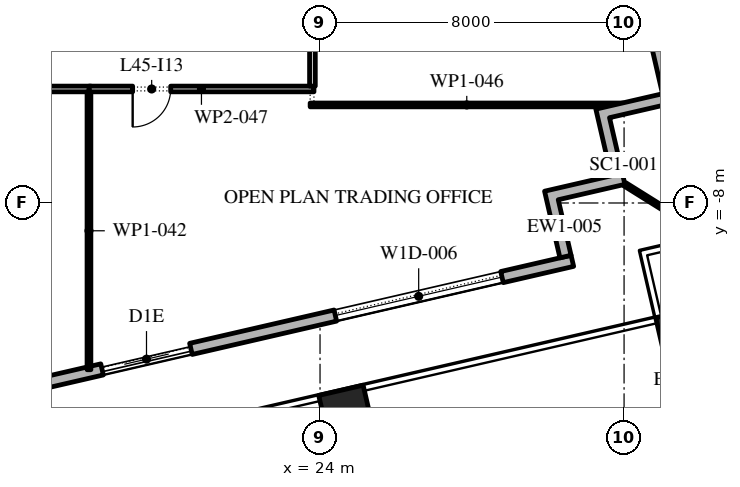
"""IFC4 building model, lengths in metres.
Left out: names, types, materials, properties, quantities, classifications, styles, units other than length and angle.
Written with IfcOpenShell. Run it as: python <this file> out.ifc"""

import sys

from ifc_helpers import new_model, si_unit, direction, frame, frame_2d, origin, origin_2d, place, context, subcontext, project, spatial, polyline, rectangle, outline, extrude, element, fill, save


model = new_model("IFC4")
c1 = context("Model", 3, precision=1e-05, world=origin(), true_north=direction((0.0, 1.0)))
c2 = subcontext(c1, "Body", "Model", "MODEL_VIEW")
j1 = project(units=[si_unit("LENGTHUNIT", "METRE"), si_unit("PLANEANGLEUNIT", "RADIAN")], contexts=[c1])
p1 = place(None, origin())
s1 = spatial("IfcSite", under=j1, at=p1, CompositionType="ELEMENT")
p2 = place(p1, origin())
s2 = spatial("IfcBuilding", under=s1, at=p2, CompositionType="ELEMENT")
p3 = place(p2, frame((0.0, 0.0, 205.2)))
s3 = spatial("IfcBuildingStorey", under=s2, at=p3, CompositionType="ELEMENT", Elevation=205.2)
for number, where, z_axis, x_axis in (
    (1, (24.685, -13.514, 0.0), (0.0, 0.0, 1.0), (0.974, 0.225, 0.0)),
    (2, (33.551, -11.467, 0.0), (0.0, 0.0, 1.0), (0.974, 0.225, 0.0)),
):
    element("IfcColumn", number, at=place(p3, frame(where, z_axis=z_axis, x_axis=x_axis)), inside=s3, PredefinedType="COLUMN", context=c2, shape_type="SweptSolid", body=[
        extrude(rectangle(XDim=1.2, YDim=1.2, at=origin_2d()), origin(), (0.0, 0.0, 1.0), 4.2),
    ])
p4 = place(p3, frame((-17.592, -20.657, 0.0), z_axis=(0.0, 0.0, 1.0), x_axis=(0.974370243697, 0.224950279389, 0.0)))
e3 = element("IfcWall", 3, at=p4, inside=s3, PredefinedType="STANDARD", context=c2, shape_type="SweptSolid", body=[
    extrude(rectangle(XDim=49.5, YDim=0.3, at=frame_2d((24.75, 0.0))), origin(), (0.0, 0.0, 1.0), 4.0),
])
p5 = place(p4, frame((2.8, 0.0, 0.0)))
e4 = element("IfcOpeningElement", 4, at=p5, cuts=e3, PredefinedType="OPENING", context=c2, shape_type="SweptSolid", body=[
    extrude(rectangle(XDim=2.4, YDim=3.5, at=frame_2d((1.2, 1.75))), frame((0.0, 0.16, 0.0), z_axis=(0.0, -1.0, 0.0), x_axis=(1.0, 0.0, 0.0)), (0.0, 0.0, 1.0), 0.32),
])
p6 = place(p4, frame((9.9, 0.0, 0.45)))
e5 = element("IfcOpeningElement", 5, at=p6, cuts=e3, PredefinedType="OPENING", context=c2, shape_type="SweptSolid", body=[
    extrude(rectangle(XDim=4.5, YDim=2.575, at=frame_2d((2.25, 1.288))), frame((0.0, 0.16, 0.0), z_axis=(0.0, -1.0, 0.0), x_axis=(1.0, 0.0, 0.0)), (0.0, 0.0, 1.0), 0.32),
])
p7 = place(p4, frame((18.2, 0.0, 0.45)))
e6 = element("IfcOpeningElement", 6, at=p7, cuts=e3, PredefinedType="OPENING", context=c2, shape_type="SweptSolid", body=[
    extrude(rectangle(XDim=4.5, YDim=3.05, at=frame_2d((2.25, 1.525))), frame((0.0, 0.16, 0.0), z_axis=(0.0, -1.0, 0.0), x_axis=(1.0, 0.0, 0.0)), (0.0, 0.0, 1.0), 0.32),
])
p8 = place(p4, frame((26.5, 0.0, 0.45)))
e7 = element("IfcOpeningElement", 7, at=p8, cuts=e3, PredefinedType="OPENING", context=c2, shape_type="SweptSolid", body=[
    extrude(rectangle(XDim=4.5, YDim=2.75, at=frame_2d((2.25, 1.375))), frame((0.0, 0.16, 0.0), z_axis=(0.0, -1.0, 0.0), x_axis=(1.0, 0.0, 0.0)), (0.0, 0.0, 1.0), 0.32),
])
p9 = place(p4, frame((36.8, 0.0, 0.0)))
e8 = element("IfcOpeningElement", 8, at=p9, cuts=e3, PredefinedType="OPENING", context=c2, shape_type="SweptSolid", body=[
    extrude(rectangle(XDim=2.4, YDim=3.275, at=frame_2d((1.2, 1.637))), frame((0.0, 0.16, 0.0), z_axis=(0.0, -1.0, 0.0), x_axis=(1.0, 0.0, 0.0)), (0.0, 0.0, 1.0), 0.32),
])
p10 = place(p4, frame((43.1, 0.0, 0.45)))
e9 = element("IfcOpeningElement", 9, at=p10, cuts=e3, PredefinedType="OPENING", context=c2, shape_type="SweptSolid", body=[
    extrude(rectangle(XDim=4.5, YDim=2.875, at=frame_2d((2.25, 1.438))), frame((0.0, 0.16, 0.0), z_axis=(0.0, -1.0, 0.0), x_axis=(1.0, 0.0, 0.0)), (0.0, 0.0, 1.0), 0.32),
])
p11 = place(p3, frame((33.157, -5.092, 0.0), z_axis=(0.0, 0.0, 1.0), x_axis=(-0.224950279389, 0.974370243697, 0.0)))
e10 = element("IfcWall", 10, at=p11, inside=s3, PredefinedType="STANDARD", context=c2, shape_type="SweptSolid", body=[
    extrude(rectangle(XDim=49.5, YDim=0.3, at=frame_2d((24.75, 0.0))), origin(), (0.0, 0.0, 1.0), 4.0),
])
p12 = place(p11, frame((2.207, 0.0, 0.0)))
e11 = element("IfcOpeningElement", 11, at=p12, cuts=e10, PredefinedType="OPENING", context=c2, shape_type="SweptSolid", body=[
    extrude(rectangle(XDim=2.4, YDim=3.125, at=frame_2d((1.2, 1.562))), frame((0.0, 0.16, 0.0), z_axis=(0.0, -1.0, 0.0), x_axis=(1.0, 0.0, 0.0)), (0.0, 0.0, 1.0), 0.32),
])
p13 = place(p11, frame((8.121, 0.0, 0.45)))
e12 = element("IfcOpeningElement", 12, at=p13, cuts=e10, PredefinedType="OPENING", context=c2, shape_type="SweptSolid", body=[
    extrude(rectangle(XDim=4.5, YDim=2.875, at=frame_2d((2.25, 1.438))), frame((0.0, 0.16, 0.0), z_axis=(0.0, -1.0, 0.0), x_axis=(1.0, 0.0, 0.0)), (0.0, 0.0, 1.0), 0.32),
])
p14 = place(p11, frame((15.236, 0.0, 0.45)))
e13 = element("IfcOpeningElement", 13, at=p14, cuts=e10, PredefinedType="OPENING", context=c2, shape_type="SweptSolid", body=[
    extrude(rectangle(XDim=4.5, YDim=2.875, at=frame_2d((2.25, 1.438))), frame((0.0, 0.16, 0.0), z_axis=(0.0, -1.0, 0.0), x_axis=(1.0, 0.0, 0.0)), (0.0, 0.0, 1.0), 0.32),
])
p15 = place(p11, frame((22.35, 0.0, 0.45)))
e14 = element("IfcOpeningElement", 14, at=p15, cuts=e10, PredefinedType="OPENING", context=c2, shape_type="SweptSolid", body=[
    extrude(rectangle(XDim=4.5, YDim=3.0, at=frame_2d((2.25, 1.5))), frame((0.0, 0.16, 0.0), z_axis=(0.0, -1.0, 0.0), x_axis=(1.0, 0.0, 0.0)), (0.0, 0.0, 1.0), 0.32),
])
p16 = place(p11, frame((30.514, 0.0, 0.0)))
e15 = element("IfcOpeningElement", 15, at=p16, cuts=e10, PredefinedType="OPENING", context=c2, shape_type="SweptSolid", body=[
    extrude(rectangle(XDim=2.4, YDim=3.45, at=frame_2d((1.2, 1.725))), frame((0.0, 0.16, 0.0), z_axis=(0.0, -1.0, 0.0), x_axis=(1.0, 0.0, 0.0)), (0.0, 0.0, 1.0), 0.32),
])
p17 = place(p11, frame((36.579, 0.0, 0.45)))
e16 = element("IfcOpeningElement", 16, at=p17, cuts=e10, PredefinedType="OPENING", context=c2, shape_type="SweptSolid", body=[
    extrude(rectangle(XDim=4.5, YDim=3.05, at=frame_2d((2.25, 1.525))), frame((0.0, 0.16, 0.0), z_axis=(0.0, -1.0, 0.0), x_axis=(1.0, 0.0, 0.0)), (0.0, 0.0, 1.0), 0.32),
])
p18 = place(p11, frame((43.693, 0.0, 0.45)))
e17 = element("IfcOpeningElement", 17, at=p18, cuts=e10, PredefinedType="OPENING", context=c2, shape_type="SweptSolid", body=[
    extrude(rectangle(XDim=4.5, YDim=3.05, at=frame_2d((2.25, 1.525))), frame((0.0, 0.16, 0.0), z_axis=(0.0, -1.0, 0.0), x_axis=(1.0, 0.0, 0.0)), (0.0, 0.0, 1.0), 0.32),
])
p19 = place(p3, origin())
e18 = element("IfcWall", 18, at=p19, inside=s3, PredefinedType="STANDARD", context=c2, shape_type="SweptSolid", body=[
    extrude(outline(polyline([(31.662, -7.285), (31.257, -5.531), (33.303, -5.058), (33.371, -5.351), (31.617, -5.756), (32.022, -7.51), (30.268, -7.914), (30.605, -9.376), (30.313, -9.443), (29.908, -7.69), (31.662, -7.285)])), origin(), (0.0, 0.0, 1.0), 4.0),
])
p20 = place(p3, frame((32.022, -7.51, -0.05), z_axis=(0.0, 0.0, 1.0), x_axis=(0.848047176257, -0.529920736377, 0.0)))
e19 = element("IfcWall", 19, at=p20, inside=s3, PredefinedType="STANDARD", context=c2, shape_type="SweptSolid", body=[
    extrude(rectangle(XDim=2.526, YDim=0.1, at=frame_2d((1.263, 0.0))), origin(), (0.0, 0.0, 1.0), 4.05),
])
p21 = place(p3, frame((17.97, -5.0, 0.0), z_axis=(0.0, 0.0, 1.0), x_axis=(-1.0, 0.0, 0.0)))
e20 = element("IfcWall", 20, at=p21, inside=s3, PredefinedType="PARTITIONING", context=c2, shape_type="SweptSolid", body=[
    extrude(rectangle(XDim=7.97, YDim=0.15, at=frame_2d((3.985, 0.0))), origin(), (0.0, 0.0, 1.0), 4.0),
])
p22 = place(p3, frame((17.92, -5.075, 0.0), z_axis=(0.0, 0.0, 1.0), x_axis=(0.0, -1.0, 0.0)))
e21 = element("IfcWall", 21, at=p22, inside=s3, PredefinedType="PARTITIONING", context=c2, shape_type="SweptSolid", body=[
    extrude(rectangle(XDim=7.312, YDim=0.1, at=frame_2d((3.656, 0.0))), origin(), (0.0, 0.0, 1.0), 4.0),
])
p23 = place(p3, frame((23.74, -5.42, 0.0), z_axis=(0.0, 0.0, 1.0), x_axis=(1.0, 0.0, 0.0)))
e22 = element("IfcWall", 22, at=p23, inside=s3, PredefinedType="PARTITIONING", context=c2, shape_type="SweptSolid", body=[
    extrude(rectangle(XDim=8.242, YDim=0.1, at=frame_2d((4.121, 0.0))), origin(), (0.0, 0.0, 1.0), 4.0),
])
p24 = place(p3, frame((23.84, -5.0, 0.0), z_axis=(0.0, 0.0, 1.0), x_axis=(-1.0, 0.0, 0.0)))
e23 = element("IfcWall", 23, at=p24, inside=s3, PredefinedType="PARTITIONING", context=c2, shape_type="SweptSolid", body=[
    extrude(rectangle(XDim=5.92, YDim=0.15, at=frame_2d((2.96, 0.0))), origin(), (0.0, 0.0, 1.0), 4.0),
])
p25 = place(p24, frame((3.77, 0.0, 0.0)))
e24 = element("IfcOpeningElement", 24, at=p25, cuts=e23, PredefinedType="OPENING", context=c2, shape_type="SweptSolid", body=[
    extrude(rectangle(XDim=1.0, YDim=2.1, at=frame_2d((0.5, 1.05))), frame((0.0, 0.085, 0.0), z_axis=(0.0, -1.0, 0.0), x_axis=(1.0, 0.0, 0.0)), (0.0, 0.0, 1.0), 0.17),
])
p26 = place(p3, frame((23.8, 2.74, 0.0), z_axis=(0.0, 0.0, 1.0), x_axis=(0.0, -1.0, 0.0)))
e25 = element("IfcWall", 25, at=p26, inside=s3, PredefinedType="PARTITIONING", context=c2, shape_type="SweptSolid", body=[
    extrude(rectangle(XDim=7.665, YDim=0.15, at=frame_2d((3.833, 0.0))), origin(), (0.0, 0.0, 1.0), 4.0),
])
p27 = place(p26, frame((4.09, 0.0, 0.0)))
e26 = element("IfcOpeningElement", 26, at=p27, cuts=e25, PredefinedType="OPENING", context=c2, shape_type="SweptSolid", body=[
    extrude(rectangle(XDim=1.0, YDim=2.1, at=frame_2d((0.5, 1.05))), frame((0.0, 0.085, 0.0), z_axis=(0.0, -1.0, 0.0), x_axis=(1.0, 0.0, 0.0)), (0.0, 0.0, 1.0), 0.17),
])
p28 = place(p9, origin())
e27 = element("IfcDoor", 27, at=p28, inside=s3, OperationType="DOUBLE_DOOR_SLIDING", PredefinedType="DOOR", context=c2, shape_type="SweptSolid", body=[
    extrude(rectangle(XDim=2.4, YDim=3.275, at=frame_2d((1.2, 1.637))), frame((0.0, 0.025, 0.0), z_axis=(0.0, -1.0, 0.0), x_axis=(1.0, 0.0, 0.0)), (0.0, 0.0, 1.0), 0.05),
])
fill(e8, e27)
p29 = place(p10, origin())
e28 = element("IfcWindow", 28, at=p29, inside=s3, PartitioningType="DOUBLE_PANEL_VERTICAL", PredefinedType="WINDOW", context=c2, shape_type="SweptSolid", body=[
    extrude(rectangle(XDim=4.5, YDim=2.875, at=frame_2d((2.25, 1.438))), frame((0.0, 0.03, 0.0), z_axis=(0.0, -1.0, 0.0), x_axis=(1.0, 0.0, 0.0)), (0.0, 0.0, 1.0), 0.06),
])
fill(e9, e28)
p30 = place(p25, origin())
e29 = element("IfcDoor", 29, at=p30, inside=s3, OperationType="SINGLE_SWING_LEFT", PredefinedType="DOOR", context=c2, shape_type="SweptSolid", body=[
    extrude(rectangle(XDim=1.0, YDim=2.1, at=frame_2d((0.5, 1.05))), frame((0.0, 0.025, 0.0), z_axis=(0.0, -1.0, 0.0), x_axis=(1.0, 0.0, 0.0)), (0.0, 0.0, 1.0), 0.05),
])
fill(e24, e29)
save(model, sys.argv[1])
